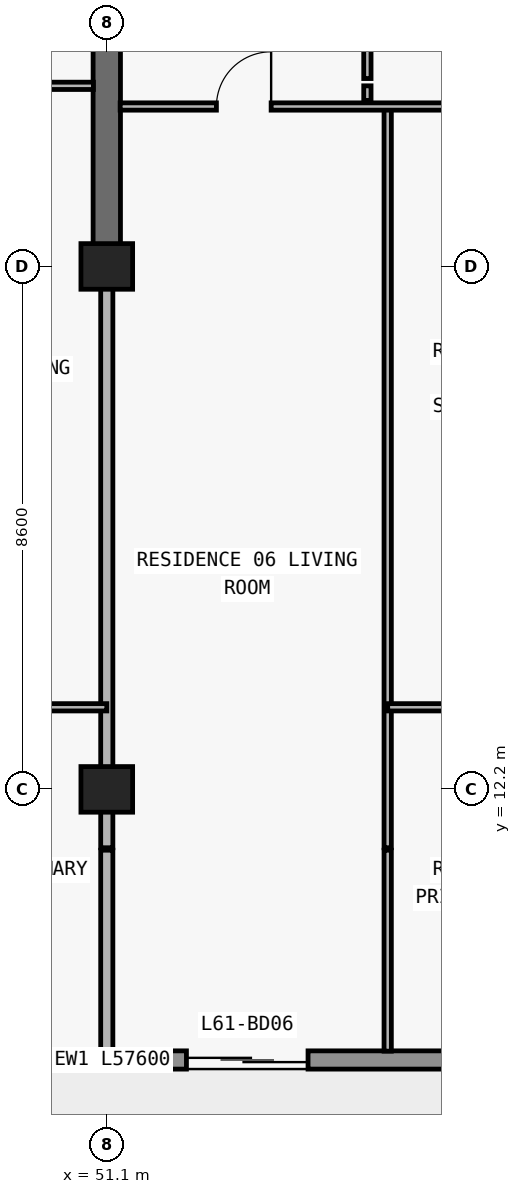
"""IFC4 building model, lengths in metres.
Left out: names, types, materials, properties, quantities, classifications, styles, units other than length and angle.
Written with IfcOpenShell. Run it as: python <this file> out.ifc"""

import sys

from ifc_helpers import new_model, si_unit, direction, frame, frame_2d, origin, origin_2d, place, context, subcontext, project, spatial, rectangle, extrude, element, fill, save


model = new_model("IFC4")
c1 = context("Model", 3, precision=1e-05, world=origin(), true_north=direction((0.0, 1.0)))
c2 = subcontext(c1, "Body", "Model", "MODEL_VIEW")
j1 = project(units=[si_unit("LENGTHUNIT", "METRE"), si_unit("PLANEANGLEUNIT", "RADIAN")], contexts=[c1])
p1 = place(None, origin())
s1 = spatial("IfcSite", under=j1, at=p1, CompositionType="ELEMENT")
p2 = place(p1, origin())
s2 = spatial("IfcBuilding", under=s1, at=p2, CompositionType="ELEMENT")
p3 = place(p2, frame((0.0, 0.0, 218.1)))
s3 = spatial("IfcBuildingStorey", under=s2, at=p3, CompositionType="ELEMENT", Elevation=218.1)
for number, where, z_axis, x_axis in (
    (1, (51.1, 12.2, 0.0), (0.0, 0.0, 1.0), (1.0, 0.0, 0.0)),
    (2, (51.1, 20.8, 0.0), (0.0, 0.0, 1.0), (1.0, 0.0, 0.0)),
):
    element("IfcColumn", number, at=place(p3, frame(where, z_axis=z_axis, x_axis=x_axis)), inside=s3, PredefinedType="COLUMN", context=c2, shape_type="SweptSolid", body=[
        extrude(rectangle(XDim=0.85, YDim=0.75, at=origin_2d()), origin(), (0.0, 0.0, 1.0), 3.0),
    ])
p4 = place(p3, frame((51.1, 20.8, 0.0), z_axis=(0.0, 0.0, 1.0), x_axis=(0.0, 1.0, 0.0)))
e3 = element("IfcWall", 3, at=p4, inside=s3, PredefinedType="SHEAR", context=c2, shape_type="SweptSolid", body=[
    extrude(rectangle(XDim=8.6, YDim=0.45, at=frame_2d((4.3, 0.0))), origin(), (0.0, 0.0, 1.0), 3.0),
])
p5 = place(p3, frame((67.7, 7.75, 0.0), z_axis=(0.0, 0.0, 1.0), x_axis=(-1.0, 0.0, 0.0)))
e4 = element("IfcWall", 4, at=p5, inside=s3, PredefinedType="STANDARD", context=c2, shape_type="SweptSolid", body=[
    extrude(rectangle(XDim=57.6, YDim=0.3, at=frame_2d((28.8, 0.0))), origin(), (0.0, 0.0, 1.0), 3.0),
])
p6 = place(p5, frame((54.673, 0.0, 0.0)))
e5 = element("IfcOpeningElement", 5, at=p6, cuts=e4, PredefinedType="OPENING", context=c2, shape_type="SweptSolid", body=[
    extrude(rectangle(XDim=2.0, YDim=2.3, at=frame_2d((1.0, 1.15))), frame((0.0, 0.16, 0.0), z_axis=(0.0, -1.0, 0.0), x_axis=(1.0, 0.0, 0.0)), (0.0, 0.0, 1.0), 0.32),
])
p7 = place(p5, frame((50.473, 0.0, 0.85)))
e6 = element("IfcOpeningElement", 6, at=p7, cuts=e4, PredefinedType="OPENING", context=c2, shape_type="SweptSolid", body=[
    extrude(rectangle(XDim=2.2, YDim=1.55, at=frame_2d((1.1, 0.775))), frame((0.0, 0.16, 0.0), z_axis=(0.0, -1.0, 0.0), x_axis=(1.0, 0.0, 0.0)), (0.0, 0.0, 1.0), 0.32),
])
p8 = place(p5, frame((46.09, 0.0, 0.0)))
e7 = element("IfcOpeningElement", 7, at=p8, cuts=e4, PredefinedType="OPENING", context=c2, shape_type="SweptSolid", body=[
    extrude(rectangle(XDim=2.0, YDim=2.3, at=frame_2d((1.0, 1.15))), frame((0.0, 0.16, 0.0), z_axis=(0.0, -1.0, 0.0), x_axis=(1.0, 0.0, 0.0)), (0.0, 0.0, 1.0), 0.32),
])
p9 = place(p5, frame((41.99, 0.0, 0.85)))
e8 = element("IfcOpeningElement", 8, at=p9, cuts=e4, PredefinedType="OPENING", context=c2, shape_type="SweptSolid", body=[
    extrude(rectangle(XDim=1.8, YDim=1.55, at=frame_2d((0.9, 0.775))), frame((0.0, 0.16, 0.0), z_axis=(0.0, -1.0, 0.0), x_axis=(1.0, 0.0, 0.0)), (0.0, 0.0, 1.0), 0.32),
])
p10 = place(p5, frame((38.026, 0.0, 0.0)))
e9 = element("IfcOpeningElement", 9, at=p10, cuts=e4, PredefinedType="OPENING", context=c2, shape_type="SweptSolid", body=[
    extrude(rectangle(XDim=2.0, YDim=2.3, at=frame_2d((1.0, 1.15))), frame((0.0, 0.16, 0.0), z_axis=(0.0, -1.0, 0.0), x_axis=(1.0, 0.0, 0.0)), (0.0, 0.0, 1.0), 0.32),
])
p11 = place(p5, frame((33.726, 0.0, 0.85)))
e10 = element("IfcOpeningElement", 10, at=p11, cuts=e4, PredefinedType="OPENING", context=c2, shape_type="SweptSolid", body=[
    extrude(rectangle(XDim=2.2, YDim=1.55, at=frame_2d((1.1, 0.775))), frame((0.0, 0.16, 0.0), z_axis=(0.0, -1.0, 0.0), x_axis=(1.0, 0.0, 0.0)), (0.0, 0.0, 1.0), 0.32),
])
p12 = place(p5, frame((29.51, 0.0, 0.0)))
e11 = element("IfcOpeningElement", 11, at=p12, cuts=e4, PredefinedType="OPENING", context=c2, shape_type="SweptSolid", body=[
    extrude(rectangle(XDim=2.0, YDim=2.3, at=frame_2d((1.0, 1.15))), frame((0.0, 0.16, 0.0), z_axis=(0.0, -1.0, 0.0), x_axis=(1.0, 0.0, 0.0)), (0.0, 0.0, 1.0), 0.32),
])
p13 = place(p5, frame((25.81, 0.0, 0.85)))
e12 = element("IfcOpeningElement", 12, at=p13, cuts=e4, PredefinedType="OPENING", context=c2, shape_type="SweptSolid", body=[
    extrude(rectangle(XDim=1.8, YDim=1.55, at=frame_2d((0.9, 0.775))), frame((0.0, 0.16, 0.0), z_axis=(0.0, -1.0, 0.0), x_axis=(1.0, 0.0, 0.0)), (0.0, 0.0, 1.0), 0.32),
])
p14 = place(p5, frame((22.026, 0.0, 0.0)))
e13 = element("IfcOpeningElement", 13, at=p14, cuts=e4, PredefinedType="OPENING", context=c2, shape_type="SweptSolid", body=[
    extrude(rectangle(XDim=2.0, YDim=2.3, at=frame_2d((1.0, 1.15))), frame((0.0, 0.16, 0.0), z_axis=(0.0, -1.0, 0.0), x_axis=(1.0, 0.0, 0.0)), (0.0, 0.0, 1.0), 0.32),
])
p15 = place(p5, frame((17.726, 0.0, 0.85)))
e14 = element("IfcOpeningElement", 14, at=p15, cuts=e4, PredefinedType="OPENING", context=c2, shape_type="SweptSolid", body=[
    extrude(rectangle(XDim=2.2, YDim=1.55, at=frame_2d((1.1, 0.775))), frame((0.0, 0.16, 0.0), z_axis=(0.0, -1.0, 0.0), x_axis=(1.0, 0.0, 0.0)), (0.0, 0.0, 1.0), 0.32),
])
p16 = place(p5, frame((13.29, 0.0, 0.0)))
e15 = element("IfcOpeningElement", 15, at=p16, cuts=e4, PredefinedType="OPENING", context=c2, shape_type="SweptSolid", body=[
    extrude(rectangle(XDim=2.0, YDim=2.3, at=frame_2d((1.0, 1.15))), frame((0.0, 0.16, 0.0), z_axis=(0.0, -1.0, 0.0), x_axis=(1.0, 0.0, 0.0)), (0.0, 0.0, 1.0), 0.32),
])
p17 = place(p5, frame((9.19, 0.0, 0.85)))
e16 = element("IfcOpeningElement", 16, at=p17, cuts=e4, PredefinedType="OPENING", context=c2, shape_type="SweptSolid", body=[
    extrude(rectangle(XDim=1.8, YDim=1.55, at=frame_2d((0.9, 0.775))), frame((0.0, 0.16, 0.0), z_axis=(0.0, -1.0, 0.0), x_axis=(1.0, 0.0, 0.0)), (0.0, 0.0, 1.0), 0.32),
])
p18 = place(p5, frame((5.273, 0.0, 0.0)))
e17 = element("IfcOpeningElement", 17, at=p18, cuts=e4, PredefinedType="OPENING", context=c2, shape_type="SweptSolid", body=[
    extrude(rectangle(XDim=2.0, YDim=2.3, at=frame_2d((1.0, 1.15))), frame((0.0, 0.16, 0.0), z_axis=(0.0, -1.0, 0.0), x_axis=(1.0, 0.0, 0.0)), (0.0, 0.0, 1.0), 0.32),
])
p19 = place(p5, frame((1.073, 0.0, 0.85)))
e18 = element("IfcOpeningElement", 18, at=p19, cuts=e4, PredefinedType="OPENING", context=c2, shape_type="SweptSolid", body=[
    extrude(rectangle(XDim=2.2, YDim=1.55, at=frame_2d((1.1, 0.775))), frame((0.0, 0.16, 0.0), z_axis=(0.0, -1.0, 0.0), x_axis=(1.0, 0.0, 0.0)), (0.0, 0.0, 1.0), 0.32),
])
p20 = place(p3, frame((51.1, 7.895, 0.0), z_axis=(0.0, 0.0, 1.0), x_axis=(0.0, 1.0, 0.0)))
e19 = element("IfcWall", 19, at=p20, inside=s3, PredefinedType="PARTITIONING", context=c2, shape_type="SweptSolid", body=[
    extrude(rectangle(XDim=3.305, YDim=0.2, at=frame_2d((1.652, 0.0))), origin(), (0.0, 0.0, 1.0), 3.0),
])
p21 = place(p3, frame((51.1, 11.24, 0.0), z_axis=(0.0, 0.0, 1.0), x_axis=(0.0, 1.0, 0.0)))
e20 = element("IfcWall", 20, at=p21, inside=s3, PredefinedType="PARTITIONING", context=c2, shape_type="SweptSolid", body=[
    extrude(rectangle(XDim=9.555, YDim=0.2, at=frame_2d((4.777, 0.0))), origin(), (0.0, 0.0, 1.0), 2.213),
])
p22 = place(p3, frame((55.386, 23.53, 0.0), z_axis=(0.0, 0.0, 1.0), x_axis=(0.0, 1.0, 0.0)))
e21 = element("IfcWall", 21, at=p22, inside=s3, PredefinedType="PARTITIONING", context=c2, shape_type="SweptSolid", body=[
    extrude(rectangle(XDim=0.24, YDim=0.12, at=frame_2d((0.12, 0.0))), origin(), (0.0, 0.0, 1.0), 2.449),
])
p23 = place(p3, frame((55.386, 23.89, 0.0), z_axis=(0.0, 0.0, 1.0), x_axis=(0.0, 1.0, 0.0)))
e22 = element("IfcWall", 22, at=p23, inside=s3, PredefinedType="PARTITIONING", context=c2, shape_type="SweptSolid", body=[
    extrude(rectangle(XDim=4.69, YDim=0.12, at=frame_2d((2.345, 0.0))), origin(), (0.0, 0.0, 1.0), 2.449),
])
p24 = place(p23, frame((1.895, 0.0, 0.0)))
e23 = element("IfcOpeningElement", 23, at=p24, cuts=e22, PredefinedType="OPENING", context=c2, shape_type="SweptSolid", body=[
    extrude(rectangle(XDim=0.9, YDim=2.15, at=frame_2d((0.45, 1.075))), frame((0.0, 0.07, 0.0), z_axis=(0.0, -1.0, 0.0), x_axis=(1.0, 0.0, 0.0)), (0.0, 0.0, 1.0), 0.14),
])
p25 = place(p3, frame((55.72, 7.895, 0.0), z_axis=(0.0, 0.0, 1.0), x_axis=(0.0, 1.0, 0.0)))
e24 = element("IfcWall", 24, at=p25, inside=s3, PredefinedType="PARTITIONING", context=c2, shape_type="SweptSolid", body=[
    extrude(rectangle(XDim=3.305, YDim=0.12, at=frame_2d((1.652, 0.0))), origin(), (0.0, 0.0, 1.0), 3.0),
])
p26 = place(p3, frame((55.72, 11.24, 0.0), z_axis=(0.0, 0.0, 1.0), x_axis=(0.0, 1.0, 0.0)))
e25 = element("IfcWall", 25, at=p26, inside=s3, PredefinedType="PARTITIONING", context=c2, shape_type="SweptSolid", body=[
    extrude(rectangle(XDim=12.19, YDim=0.12, at=frame_2d((6.095, 0.0))), origin(), (0.0, 0.0, 1.0), 3.0),
])
p27 = place(p3, frame((46.648, 13.55, 0.0), z_axis=(0.0, 0.0, 1.0), x_axis=(1.0, 0.0, 0.0)))
e26 = element("IfcWall", 26, at=p27, inside=s3, PredefinedType="PARTITIONING", context=c2, shape_type="SweptSolid", body=[
    extrude(rectangle(XDim=4.452, YDim=0.12, at=frame_2d((2.226, 0.0))), origin(), (0.0, 0.0, 1.0), 3.0),
])
p28 = place(p27, frame((1.776, 0.0, 0.0)))
e27 = element("IfcOpeningElement", 27, at=p28, cuts=e26, PredefinedType="OPENING", context=c2, shape_type="SweptSolid", body=[
    extrude(rectangle(XDim=0.9, YDim=2.15, at=frame_2d((0.45, 1.075))), frame((0.0, 0.07, 0.0), z_axis=(0.0, -1.0, 0.0), x_axis=(1.0, 0.0, 0.0)), (0.0, 0.0, 1.0), 0.14),
])
p29 = place(p3, frame((55.72, 13.55, 0.0), z_axis=(0.0, 0.0, 1.0), x_axis=(1.0, 0.0, 0.0)))
e28 = element("IfcWall", 28, at=p29, inside=s3, PredefinedType="PARTITIONING", context=c2, shape_type="SweptSolid", body=[
    extrude(rectangle(XDim=3.78, YDim=0.12, at=frame_2d((1.89, 0.0))), origin(), (0.0, 0.0, 1.0), 3.0),
])
p30 = place(p29, frame((1.44, 0.0, 0.0)))
e29 = element("IfcOpeningElement", 29, at=p30, cuts=e28, PredefinedType="OPENING", context=c2, shape_type="SweptSolid", body=[
    extrude(rectangle(XDim=0.9, YDim=2.15, at=frame_2d((0.45, 1.075))), frame((0.0, 0.07, 0.0), z_axis=(0.0, -1.0, 0.0), x_axis=(1.0, 0.0, 0.0)), (0.0, 0.0, 1.0), 0.14),
])
p31 = place(p3, frame((51.32, 23.43, 0.0), z_axis=(0.0, 0.0, 1.0), x_axis=(1.0, 0.0, 0.0)))
e30 = element("IfcWall", 30, at=p31, inside=s3, PredefinedType="PARTITIONING", context=c2, shape_type="SweptSolid", body=[
    extrude(rectangle(XDim=8.18, YDim=0.12, at=frame_2d((4.09, 0.0))), origin(), (0.0, 0.0, 1.0), 3.0),
])
p32 = place(p31, frame((1.583, 0.0, 0.0)))
e31 = element("IfcOpeningElement", 31, at=p32, cuts=e30, PredefinedType="OPENING", context=c2, shape_type="SweptSolid", body=[
    extrude(rectangle(XDim=0.9, YDim=2.15, at=frame_2d((0.45, 1.075))), frame((0.0, 0.07, 0.0), z_axis=(0.0, -1.0, 0.0), x_axis=(1.0, 0.0, 0.0)), (0.0, 0.0, 1.0), 0.14),
])
p33 = place(p31, frame((5.84, 0.0, 0.0)))
e32 = element("IfcOpeningElement", 32, at=p33, cuts=e30, PredefinedType="OPENING", context=c2, shape_type="SweptSolid", body=[
    extrude(rectangle(XDim=0.9, YDim=2.15, at=frame_2d((0.45, 1.075))), frame((0.0, 0.07, 0.0), z_axis=(0.0, -1.0, 0.0), x_axis=(1.0, 0.0, 0.0)), (0.0, 0.0, 1.0), 0.14),
])
p34 = place(p3, frame((42.7, 23.77, 0.0), z_axis=(0.0, 0.0, 1.0), x_axis=(1.0, 0.0, 0.0)))
e33 = element("IfcWall", 33, at=p34, inside=s3, PredefinedType="PARTITIONING", context=c2, shape_type="SweptSolid", body=[
    extrude(rectangle(XDim=8.18, YDim=0.12, at=frame_2d((4.09, 0.0))), origin(), (0.0, 0.0, 1.0), 3.0),
])
p35 = place(p34, frame((1.524, 0.0, 0.0)))
e34 = element("IfcOpeningElement", 34, at=p35, cuts=e33, PredefinedType="OPENING", context=c2, shape_type="SweptSolid", body=[
    extrude(rectangle(XDim=0.9, YDim=2.15, at=frame_2d((0.45, 1.075))), frame((0.0, 0.07, 0.0), z_axis=(0.0, -1.0, 0.0), x_axis=(1.0, 0.0, 0.0)), (0.0, 0.0, 1.0), 0.14),
])
p36 = place(p34, frame((6.033, 0.0, 0.0)))
e35 = element("IfcOpeningElement", 35, at=p36, cuts=e33, PredefinedType="OPENING", context=c2, shape_type="SweptSolid", body=[
    extrude(rectangle(XDim=0.9, YDim=2.15, at=frame_2d((0.45, 1.075))), frame((0.0, 0.07, 0.0), z_axis=(0.0, -1.0, 0.0), x_axis=(1.0, 0.0, 0.0)), (0.0, 0.0, 1.0), 0.14),
])
p37 = place(p16, origin())
e36 = element("IfcDoor", 36, at=p37, inside=s3, OperationType="DOUBLE_DOOR_SLIDING", PredefinedType="DOOR", context=c2, shape_type="SweptSolid", body=[
    extrude(rectangle(XDim=2.0, YDim=2.3, at=frame_2d((1.0, 1.15))), frame((0.0, 0.025, 0.0), z_axis=(0.0, -1.0, 0.0), x_axis=(1.0, 0.0, 0.0)), (0.0, 0.0, 1.0), 0.05),
])
fill(e15, e36)
p38 = place(p32, origin())
e37 = element("IfcDoor", 37, at=p38, inside=s3, OperationType="SINGLE_SWING_RIGHT", PredefinedType="DOOR", context=c2, shape_type="SweptSolid", body=[
    extrude(rectangle(XDim=0.9, YDim=2.15, at=frame_2d((0.45, 1.075))), frame((0.0, 0.025, 0.0), z_axis=(0.0, -1.0, 0.0), x_axis=(1.0, 0.0, 0.0)), (0.0, 0.0, 1.0), 0.05),
])
fill(e31, e37)
save(model, sys.argv[1])
